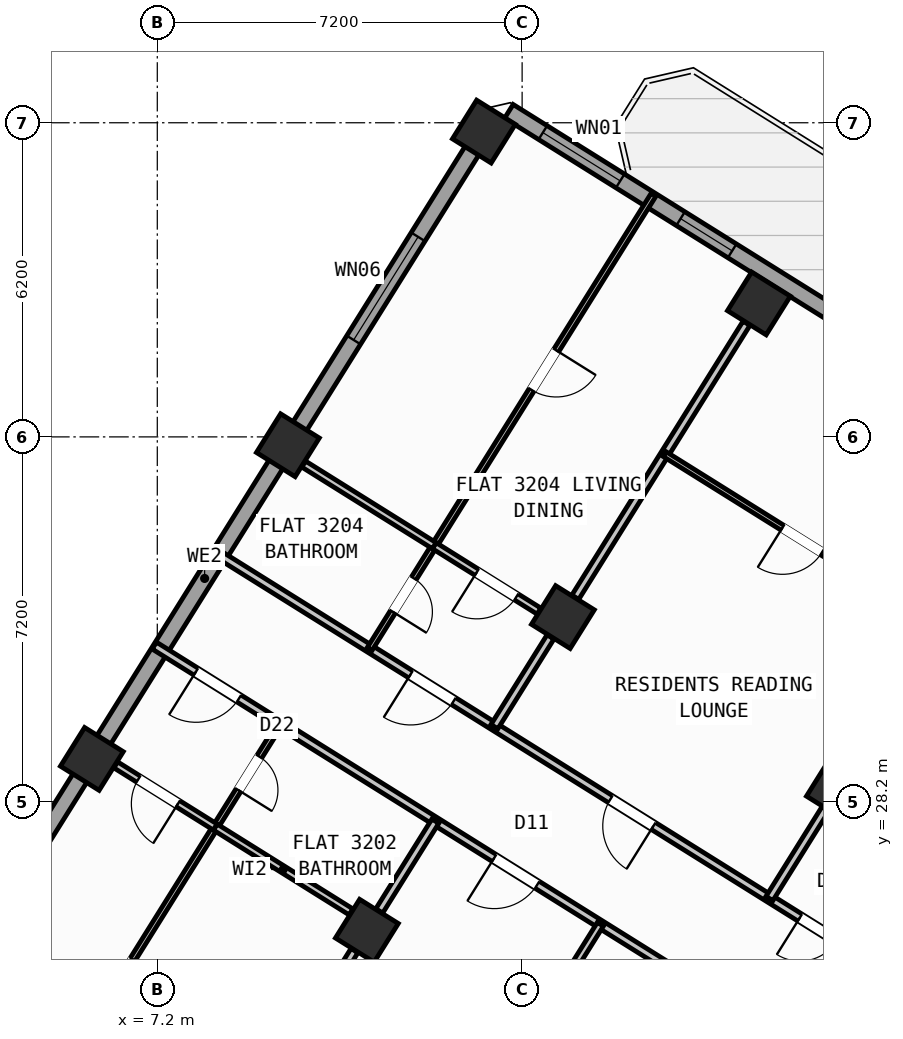
"""IFC4 building model, lengths in metres.
Left out: names, types, materials, properties, quantities, classifications, styles, units other than length and angle.
Written with IfcOpenShell. Run it as: python <this file> out.ifc"""

import sys

from ifc_helpers import new_model, si_unit, direction, frame, frame_2d, origin, origin_2d, place, context, subcontext, project, spatial, rectangle, hollow_rectangle, extrude, source, transform, mapped, element, fill, save


model = new_model("IFC4")
c1 = context("Model", 3, precision=1e-05, world=origin(), true_north=direction((0.0, 1.0)))
c2 = subcontext(c1, "Body", "Model", "MODEL_VIEW")
j1 = project(units=[si_unit("LENGTHUNIT", "METRE"), si_unit("PLANEANGLEUNIT", "RADIAN")], contexts=[c1])
p1 = place(None, origin())
s1 = spatial("IfcSite", under=j1, at=p1, CompositionType="ELEMENT")
p2 = place(p1, origin())
s2 = spatial("IfcBuilding", under=s1, at=p2, CompositionType="ELEMENT")
p3 = place(p2, frame((0.0, 0.0, 127.8)))
s3 = spatial("IfcBuildingStorey", under=s2, at=p3, CompositionType="ELEMENT", Elevation=127.8)
m1 = source(origin(), c2, "Body", "SweptSolid", [
    extrude(hollow_rectangle(XDim=0.9, YDim=0.9, WallThickness=0.036, at=origin_2d()), origin(), (0.0, 0.0, 1.0), 4.8),
])
for number, where, z_axis, x_axis in (
    (1, (20.632, 28.452, 0.0), (0.0, 0.0, 1.0), (-0.848, 0.53, 0.0)),
    (2, (19.073, 38.034, 0.0), (0.0, 0.0, 1.0), (-0.848, 0.53, 0.0)),
    (3, (15.205, 31.844, 0.0), (0.0, 0.0, 1.0), (-0.848, 0.53, 0.0)),
    (4, (11.336, 25.653, 0.0), (0.0, 0.0, 1.0), (-0.848, 0.53, 0.0)),
    (5, (13.646, 41.426, 0.0), (0.0, 0.0, 1.0), (-0.848, 0.53, 0.0)),
    (6, (9.777, 35.235, 0.0), (0.0, 0.0, 1.0), (-0.848, 0.53, 0.0)),
    (7, (5.909, 29.044, 0.0), (0.0, 0.0, 1.0), (-0.848, 0.53, 0.0)),
):
    element("IfcColumn", number, at=place(p3, frame(where, z_axis=z_axis, x_axis=x_axis)), inside=s3, PredefinedType="COLUMN", context=c2, shape_type="MappedRepresentation", body=[
        mapped(m1, transform((0.0, 0.0, 0.0), scale=1.0)),
    ])
p4 = place(p3, frame((2.415, 23.452, 0.0), z_axis=(0.0, 0.0, 1.0), x_axis=(0.52991049553, 0.848053575387, 0.0)))
e8 = element("IfcWall", 8, at=p4, inside=s3, PredefinedType="STANDARD", context=c2, shape_type="SweptSolid", body=[
    extrude(rectangle(XDim=21.587, YDim=0.32, at=frame_2d((10.794, 0.0))), origin(), (0.0, 0.0, 1.0), 3.975),
])
p5 = place(p4, frame((16.344, 0.0, 0.75)))
e9 = element("IfcOpeningElement", 9, at=p5, cuts=e8, PredefinedType="OPENING", context=c2, shape_type="SweptSolid", body=[
    extrude(rectangle(XDim=2.4, YDim=1.6, at=frame_2d((1.2, 0.8))), frame((0.0, 0.17, 0.0), z_axis=(0.0, -1.0, 0.0), x_axis=(1.0, 0.0, 0.0)), (0.0, 0.0, 1.0), 0.34),
])
p6 = place(p3, frame((14.138, 41.825, 0.0), z_axis=(0.0, 0.0, 1.0), x_axis=(0.848046498049, -0.529921821731, 0.0)))
e10 = element("IfcWall", 10, at=p6, inside=s3, PredefinedType="STANDARD", context=c2, shape_type="SweptSolid", body=[
    extrude(rectangle(XDim=31.588, YDim=0.32, at=frame_2d((15.794, 0.0))), origin(), (0.0, 0.0, 1.0), 4.55),
])
p7 = place(p6, frame((9.69, 0.0, 0.0)))
e11 = element("IfcOpeningElement", 11, at=p7, cuts=e10, PredefinedType="OPENING", context=c2, shape_type="SweptSolid", body=[
    extrude(rectangle(XDim=1.05, YDim=2.15, at=frame_2d((0.525, 1.075))), frame((0.0, 0.17, 0.0), z_axis=(0.0, -1.0, 0.0), x_axis=(1.0, 0.0, 0.0)), (0.0, 0.0, 1.0), 0.34),
])
p8 = place(p6, frame((14.666, 0.0, 0.0)))
e12 = element("IfcOpeningElement", 12, at=p8, cuts=e10, PredefinedType="OPENING", context=c2, shape_type="SweptSolid", body=[
    extrude(rectangle(XDim=1.5, YDim=2.25, at=frame_2d((0.75, 1.125))), frame((0.0, 0.17, 0.0), z_axis=(0.0, -1.0, 0.0), x_axis=(1.0, 0.0, 0.0)), (0.0, 0.0, 1.0), 0.34),
])
p9 = place(p6, frame((0.791, 0.0, 0.85)))
e13 = element("IfcOpeningElement", 13, at=p9, cuts=e10, PredefinedType="OPENING", context=c2, shape_type="SweptSolid", body=[
    extrude(rectangle(XDim=1.8, YDim=1.5, at=frame_2d((0.9, 0.75))), frame((0.0, 0.17, 0.0), z_axis=(0.0, -1.0, 0.0), x_axis=(1.0, 0.0, 0.0)), (0.0, 0.0, 1.0), 0.34),
])
p10 = place(p6, frame((3.996, 0.0, 0.95)))
e14 = element("IfcOpeningElement", 14, at=p10, cuts=e10, PredefinedType="OPENING", context=c2, shape_type="SweptSolid", body=[
    extrude(rectangle(XDim=1.2, YDim=1.4, at=frame_2d((0.6, 0.7))), frame((0.0, 0.17, 0.0), z_axis=(0.0, -1.0, 0.0), x_axis=(1.0, 0.0, 0.0)), (0.0, 0.0, 1.0), 0.34),
])
p11 = place(p6, frame((7.582, 0.0, 0.95)))
e15 = element("IfcOpeningElement", 15, at=p11, cuts=e10, PredefinedType="OPENING", context=c2, shape_type="SweptSolid", body=[
    extrude(rectangle(XDim=1.2, YDim=1.4, at=frame_2d((0.6, 0.7))), frame((0.0, 0.17, 0.0), z_axis=(0.0, -1.0, 0.0), x_axis=(1.0, 0.0, 0.0)), (0.0, 0.0, 1.0), 0.34),
])
p12 = place(p6, frame((21.381, 0.0, 0.75)))
e16 = element("IfcOpeningElement", 16, at=p12, cuts=e10, PredefinedType="OPENING", context=c2, shape_type="SweptSolid", body=[
    extrude(rectangle(XDim=2.4, YDim=1.6, at=frame_2d((1.2, 0.8))), frame((0.0, 0.17, 0.0), z_axis=(0.0, -1.0, 0.0), x_axis=(1.0, 0.0, 0.0)), (0.0, 0.0, 1.0), 0.34),
])
p13 = place(p6, frame((26.956, 0.0, 0.75)))
e17 = element("IfcOpeningElement", 17, at=p13, cuts=e10, PredefinedType="OPENING", context=c2, shape_type="SweptSolid", body=[
    extrude(rectangle(XDim=2.4, YDim=1.6, at=frame_2d((1.2, 0.8))), frame((0.0, 0.17, 0.0), z_axis=(0.0, -1.0, 0.0), x_axis=(1.0, 0.0, 0.0)), (0.0, 0.0, 1.0), 0.34),
])
p14 = place(p3, frame((22.495, 24.281, 0.0), z_axis=(0.0, 0.0, 1.0), x_axis=(-0.848052408131, 0.529912363569, 0.0)))
e18 = element("IfcWall", 18, at=p14, inside=s3, PredefinedType="PARTITIONING", context=c2, shape_type="SweptSolid", body=[
    extrude(rectangle(XDim=16.73, YDim=0.16, at=frame_2d((8.365, 0.0))), origin(), (0.0, 0.0, 1.0), 4.54),
])
p15 = place(p14, frame((2.22, 0.0, 0.0)))
e19 = element("IfcOpeningElement", 19, at=p15, cuts=e18, PredefinedType="OPENING", context=c2, shape_type="SweptSolid", body=[
    extrude(rectangle(XDim=0.86, YDim=2.05, at=frame_2d((0.43, 1.025))), frame((0.0, 0.09, 0.0), z_axis=(0.0, -1.0, 0.0), x_axis=(1.0, 0.0, 0.0)), (0.0, 0.0, 1.0), 0.18),
])
p16 = place(p14, frame((6.49, 0.0, 0.0)))
e20 = element("IfcOpeningElement", 20, at=p16, cuts=e18, PredefinedType="OPENING", context=c2, shape_type="SweptSolid", body=[
    extrude(rectangle(XDim=1.0, YDim=2.1, at=frame_2d((0.5, 1.05))), frame((0.0, 0.09, 0.0), z_axis=(0.0, -1.0, 0.0), x_axis=(1.0, 0.0, 0.0)), (0.0, 0.0, 1.0), 0.18),
])
p17 = place(p14, frame((11.14, 0.0, 0.0)))
e21 = element("IfcOpeningElement", 21, at=p17, cuts=e18, PredefinedType="OPENING", context=c2, shape_type="SweptSolid", body=[
    extrude(rectangle(XDim=1.0, YDim=2.1, at=frame_2d((0.5, 1.05))), frame((0.0, 0.09, 0.0), z_axis=(0.0, -1.0, 0.0), x_axis=(1.0, 0.0, 0.0)), (0.0, 0.0, 1.0), 0.18),
])
p18 = place(p3, frame((21.329, 22.416, 0.0), z_axis=(0.0, 0.0, 1.0), x_axis=(-0.848052408131, 0.529912363569, 0.0)))
e22 = element("IfcWall", 22, at=p18, inside=s3, PredefinedType="PARTITIONING", context=c2, shape_type="SweptSolid", body=[
    extrude(rectangle(XDim=16.73, YDim=0.16, at=frame_2d((8.365, 0.0))), origin(), (0.0, 0.0, 1.0), 4.54),
])
p19 = place(p18, frame((1.395, 0.0, 0.0)))
e23 = element("IfcOpeningElement", 23, at=p19, cuts=e22, PredefinedType="OPENING", context=c2, shape_type="SweptSolid", body=[
    extrude(rectangle(XDim=1.0, YDim=2.1, at=frame_2d((0.5, 1.05))), frame((0.0, 0.09, 0.0), z_axis=(0.0, -1.0, 0.0), x_axis=(1.0, 0.0, 0.0)), (0.0, 0.0, 1.0), 0.18),
])
p20 = place(p18, frame((7.82, 0.0, 0.0)))
e24 = element("IfcOpeningElement", 24, at=p20, cuts=e22, PredefinedType="OPENING", context=c2, shape_type="SweptSolid", body=[
    extrude(rectangle(XDim=1.0, YDim=2.1, at=frame_2d((0.5, 1.05))), frame((0.0, 0.09, 0.0), z_axis=(0.0, -1.0, 0.0), x_axis=(1.0, 0.0, 0.0)), (0.0, 0.0, 1.0), 0.18),
])
p21 = place(p18, frame((14.76, 0.0, 0.0)))
e25 = element("IfcOpeningElement", 25, at=p21, cuts=e22, PredefinedType="OPENING", context=c2, shape_type="SweptSolid", body=[
    extrude(rectangle(XDim=1.0, YDim=2.1, at=frame_2d((0.5, 1.05))), frame((0.0, 0.09, 0.0), z_axis=(0.0, -1.0, 0.0), x_axis=(1.0, 0.0, 0.0)), (0.0, 0.0, 1.0), 0.18),
])
p22 = place(p3, frame((12.688, 27.815, 0.0), z_axis=(0.0, 0.0, 1.0), x_axis=(-0.529988430496, -0.848004872356, 0.0)))
e26 = element("IfcWall", 26, at=p22, inside=s3, PredefinedType="PARTITIONING", context=c2, shape_type="SweptSolid", body=[
    extrude(rectangle(XDim=2.088, YDim=0.16, at=frame_2d((1.044, 0.0))), origin(), (0.0, 0.0, 1.0), 3.975),
])
p23 = place(p3, frame((11.091, 25.261, 0.0), z_axis=(0.0, 0.0, 1.0), x_axis=(-0.52994257524, -0.848033529377, 0.0)))
e27 = element("IfcWall", 27, at=p23, inside=s3, PredefinedType="PARTITIONING", context=c2, shape_type="SweptSolid", body=[
    extrude(rectangle(XDim=5.451, YDim=0.16, at=frame_2d((2.726, 0.0))), origin(), (0.0, 0.0, 1.0), 3.975),
])
p24 = place(p3, frame((15.944, 25.781, 0.0), z_axis=(0.0, 0.0, 1.0), x_axis=(-0.529917480809, -0.848049210561, 0.0)))
e28 = element("IfcWall", 28, at=p24, inside=s3, PredefinedType="PLUMBINGWALL", context=c2, shape_type="SweptSolid", body=[
    extrude(rectangle(XDim=4.58, YDim=0.14, at=frame_2d((2.29, 0.0))), origin(), (0.0, 0.0, 1.0), 4.54),
])
p25 = place(p24, frame((1.9, 0.0, 0.0)))
e29 = element("IfcOpeningElement", 29, at=p25, cuts=e28, PredefinedType="OPENING", context=c2, shape_type="SweptSolid", body=[
    extrude(rectangle(XDim=0.78, YDim=2.05, at=frame_2d((0.39, 1.025))), frame((0.0, 0.08, 0.0), z_axis=(0.0, -1.0, 0.0), x_axis=(1.0, 0.0, 0.0)), (0.0, 0.0, 1.0), 0.16),
])
p26 = place(p3, frame((9.617, 29.734, 0.0), z_axis=(0.0, 0.0, 1.0), x_axis=(-0.529917830441, -0.848048992088, 0.0)))
e30 = element("IfcWall", 30, at=p26, inside=s3, PredefinedType="PARTITIONING", context=c2, shape_type="SweptSolid", body=[
    extrude(rectangle(XDim=9.47, YDim=0.11, at=frame_2d((4.735, 0.0))), origin(), (0.0, 0.0, 1.0), 4.54),
])
p27 = place(p26, frame((0.76, 0.0, 0.0)))
e31 = element("IfcOpeningElement", 31, at=p27, cuts=e30, PredefinedType="OPENING", context=c2, shape_type="SweptSolid", body=[
    extrude(rectangle(XDim=0.78, YDim=2.05, at=frame_2d((0.39, 1.025))), frame((0.0, 0.065, 0.0), z_axis=(0.0, -1.0, 0.0), x_axis=(1.0, 0.0, 0.0)), (0.0, 0.0, 1.0), 0.13),
])
p28 = place(p26, frame((5.475, 0.0, 0.0)))
e32 = element("IfcOpeningElement", 32, at=p28, cuts=e30, PredefinedType="OPENING", context=c2, shape_type="SweptSolid", body=[
    extrude(rectangle(XDim=0.92, YDim=2.08, at=frame_2d((0.46, 1.04))), frame((0.0, 0.065, 0.0), z_axis=(0.0, -1.0, 0.0), x_axis=(1.0, 0.0, 0.0)), (0.0, 0.0, 1.0), 0.13),
])
p29 = place(p3, frame((8.346, 27.698, 0.0), z_axis=(0.0, 0.0, 1.0), x_axis=(-0.848021970166, 0.529961072265, 0.0)))
e33 = element("IfcWall", 33, at=p29, inside=s3, PredefinedType="PLUMBINGWALL", context=c2, shape_type="SweptSolid", body=[
    extrude(rectangle(XDim=2.318, YDim=0.14, at=frame_2d((1.159, 0.0))), origin(), (0.0, 0.0, 1.0), 3.975),
])
p30 = place(p29, frame((0.87, 0.0, 0.0)))
e34 = element("IfcOpeningElement", 34, at=p30, cuts=e33, PredefinedType="OPENING", context=c2, shape_type="SweptSolid", body=[
    extrude(rectangle(XDim=0.92, YDim=2.08, at=frame_2d((0.46, 1.04))), frame((0.0, 0.08, 0.0), z_axis=(0.0, -1.0, 0.0), x_axis=(1.0, 0.0, 0.0)), (0.0, 0.0, 1.0), 0.16),
])
p31 = place(p3, frame((11.024, 26.025, 0.0), z_axis=(0.0, 0.0, 1.0), x_axis=(-0.848054764307, 0.529908592812, 0.0)))
e35 = element("IfcWall", 35, at=p31, inside=s3, PredefinedType="PLUMBINGWALL", context=c2, shape_type="SweptSolid", body=[
    extrude(rectangle(XDim=3.158, YDim=0.14, at=frame_2d((1.579, 0.0))), origin(), (0.0, 0.0, 1.0), 3.975),
])
p32 = place(p3, frame((20.387, 28.06, 0.0), z_axis=(0.0, 0.0, 1.0), x_axis=(-0.529904345651, -0.848057418139, 0.0)))
e36 = element("IfcWall", 36, at=p32, inside=s3, PredefinedType="PARTITIONING", context=c2, shape_type="SweptSolid", body=[
    extrude(rectangle(XDim=2.088, YDim=0.16, at=frame_2d((1.044, 0.0))), origin(), (0.0, 0.0, 1.0), 3.975),
])
p33 = place(p3, frame((18.828, 37.643, 0.0), z_axis=(0.0, 0.0, 1.0), x_axis=(-0.529930102756, -0.848041323399, 0.0)))
e37 = element("IfcWall", 37, at=p33, inside=s3, PredefinedType="PARTITIONING", context=c2, shape_type="SweptSolid", body=[
    extrude(rectangle(XDim=6.376, YDim=0.16, at=frame_2d((3.188, 0.0))), origin(), (0.0, 0.0, 1.0), 3.975),
])
p34 = place(p3, frame((14.96, 31.452, 0.0), z_axis=(0.0, 0.0, 1.0), x_axis=(-0.529956894714, -0.848024580862, 0.0)))
e38 = element("IfcWall", 38, at=p34, inside=s3, PredefinedType="PARTITIONING", context=c2, shape_type="SweptSolid", body=[
    extrude(rectangle(XDim=2.088, YDim=0.16, at=frame_2d((1.044, 0.0))), origin(), (0.0, 0.0, 1.0), 3.975),
])
p35 = place(p3, frame((22.642, 31.668, 0.0), z_axis=(0.0, 0.0, 1.0), x_axis=(-0.84806687439, 0.529889211593, 0.0)))
e39 = element("IfcWall", 39, at=p35, inside=s3, PredefinedType="PARTITIONING", context=c2, shape_type="SweptSolid", body=[
    extrude(rectangle(XDim=6.4, YDim=0.11, at=frame_2d((3.2, 0.0))), origin(), (0.0, 0.0, 1.0), 4.54),
])
p36 = place(p35, frame((2.74, 0.0, 0.0)))
e40 = element("IfcOpeningElement", 40, at=p36, cuts=e39, PredefinedType="OPENING", context=c2, shape_type="SweptSolid", body=[
    extrude(rectangle(XDim=0.92, YDim=2.08, at=frame_2d((0.46, 1.04))), frame((0.0, 0.065, 0.0), z_axis=(0.0, -1.0, 0.0), x_axis=(1.0, 0.0, 0.0)), (0.0, 0.0, 1.0), 0.13),
])
p37 = place(p3, frame((16.995, 40.182, 0.0), z_axis=(0.0, 0.0, 1.0), x_axis=(-0.529924195719, -0.848045014602, 0.0)))
e41 = element("IfcWall", 41, at=p37, inside=s3, PredefinedType="PARTITIONING", context=c2, shape_type="SweptSolid", body=[
    extrude(rectangle(XDim=10.57, YDim=0.11, at=frame_2d((5.285, 0.0))), origin(), (0.0, 0.0, 1.0), 4.54),
])
p38 = place(p37, frame((8.93, 0.0, 0.0)))
e42 = element("IfcOpeningElement", 42, at=p38, cuts=e41, PredefinedType="OPENING", context=c2, shape_type="SweptSolid", body=[
    extrude(rectangle(XDim=0.78, YDim=2.05, at=frame_2d((0.39, 1.025))), frame((0.0, 0.065, 0.0), z_axis=(0.0, -1.0, 0.0), x_axis=(1.0, 0.0, 0.0)), (0.0, 0.0, 1.0), 0.13),
])
p39 = place(p37, frame((3.625, 0.0, 0.0)))
e43 = element("IfcOpeningElement", 43, at=p39, cuts=e41, PredefinedType="OPENING", context=c2, shape_type="SweptSolid", body=[
    extrude(rectangle(XDim=0.92, YDim=2.08, at=frame_2d((0.46, 1.04))), frame((0.0, 0.065, 0.0), z_axis=(0.0, -1.0, 0.0), x_axis=(1.0, 0.0, 0.0)), (0.0, 0.0, 1.0), 0.13),
])
p40 = place(p3, frame((14.733, 31.961, 0.0), z_axis=(0.0, 0.0, 1.0), x_axis=(-0.848020807548, 0.529962932634, 0.0)))
e44 = element("IfcWall", 44, at=p40, inside=s3, PredefinedType="PLUMBINGWALL", context=c2, shape_type="SweptSolid", body=[
    extrude(rectangle(XDim=2.438, YDim=0.14, at=frame_2d((1.219, 0.0))), origin(), (0.0, 0.0, 1.0), 3.975),
])
p41 = place(p40, frame((0.528, 0.0, 0.0)))
e45 = element("IfcOpeningElement", 45, at=p41, cuts=e44, PredefinedType="OPENING", context=c2, shape_type="SweptSolid", body=[
    extrude(rectangle(XDim=0.92, YDim=2.08, at=frame_2d((0.46, 1.04))), frame((0.0, 0.08, 0.0), z_axis=(0.0, -1.0, 0.0), x_axis=(1.0, 0.0, 0.0)), (0.0, 0.0, 1.0), 0.16),
])
p42 = place(p3, frame((12.666, 33.253, 0.0), z_axis=(0.0, 0.0, 1.0), x_axis=(-0.848056989933, 0.52990503095, 0.0)))
e46 = element("IfcWall", 46, at=p42, inside=s3, PredefinedType="PLUMBINGWALL", context=c2, shape_type="SweptSolid", body=[
    extrude(rectangle(XDim=3.038, YDim=0.14, at=frame_2d((1.519, 0.0))), origin(), (0.0, 0.0, 1.0), 3.975),
])
m2 = source(origin(), c2, "Body", "SweptSolid", [
    extrude(rectangle(XDim=2.4, YDim=1.6, at=frame_2d((1.2, 0.8))), frame((0.0, 0.03, 0.0), z_axis=(0.0, -1.0, 0.0), x_axis=(1.0, 0.0, 0.0)), (0.0, 0.0, 1.0), 0.06),
])
p43 = place(p5, origin())
e47 = element("IfcWindow", 47, at=p43, inside=s3, PartitioningType="SINGLE_PANEL", PredefinedType="WINDOW", context=c2, shape_type="MappedRepresentation", body=[
    mapped(m2, transform((0.0, 0.0, 0.0), scale=1.0)),
])
fill(e9, e47)
m3 = source(origin(), c2, "Body", "SweptSolid", [
    extrude(rectangle(XDim=1.8, YDim=1.5, at=frame_2d((0.9, 0.75))), frame((0.0, 0.03, 0.0), z_axis=(0.0, -1.0, 0.0), x_axis=(1.0, 0.0, 0.0)), (0.0, 0.0, 1.0), 0.06),
])
p44 = place(p9, origin())
e48 = element("IfcWindow", 48, at=p44, inside=s3, PartitioningType="SINGLE_PANEL", PredefinedType="WINDOW", context=c2, shape_type="MappedRepresentation", body=[
    mapped(m3, transform((0.0, 0.0, 0.0), scale=1.0)),
])
fill(e13, e48)
m4 = source(origin(), c2, "Body", "SweptSolid", [
    extrude(rectangle(XDim=1.2, YDim=1.4, at=frame_2d((0.6, 0.7))), frame((0.0, 0.03, 0.0), z_axis=(0.0, -1.0, 0.0), x_axis=(1.0, 0.0, 0.0)), (0.0, 0.0, 1.0), 0.06),
])
p45 = place(p10, origin())
e49 = element("IfcWindow", 49, at=p45, inside=s3, PartitioningType="SINGLE_PANEL", PredefinedType="WINDOW", context=c2, shape_type="MappedRepresentation", body=[
    mapped(m4, transform((0.0, 0.0, 0.0), scale=1.0)),
])
fill(e14, e49)
m5 = source(origin(), c2, "Body", "SweptSolid", [
    extrude(rectangle(XDim=1.0, YDim=2.1, at=frame_2d((0.5, 1.05))), frame((0.0, 0.025, 0.0), z_axis=(0.0, -1.0, 0.0), x_axis=(1.0, 0.0, 0.0)), (0.0, 0.0, 1.0), 0.05),
])
p46 = place(p20, origin())
e50 = element("IfcDoor", 50, at=p46, inside=s3, OperationType="SINGLE_SWING_RIGHT", PredefinedType="DOOR", context=c2, shape_type="MappedRepresentation", body=[
    mapped(m5, transform((0.0, 0.0, 0.0), scale=1.0)),
])
fill(e24, e50)
p47 = place(p21, origin())
e51 = element("IfcDoor", 51, at=p47, inside=s3, OperationType="SINGLE_SWING_RIGHT", PredefinedType="DOOR", context=c2, shape_type="MappedRepresentation", body=[
    mapped(m5, transform((0.0, 0.0, 0.0), scale=1.0)),
])
fill(e25, e51)
m6 = source(origin(), c2, "Body", "SweptSolid", [
    extrude(rectangle(XDim=0.92, YDim=2.08, at=frame_2d((0.46, 1.04))), frame((0.0, 0.025, 0.0), z_axis=(0.0, -1.0, 0.0), x_axis=(1.0, 0.0, 0.0)), (0.0, 0.0, 1.0), 0.05),
])
p48 = place(p30, origin())
e52 = element("IfcDoor", 52, at=p48, inside=s3, OperationType="SINGLE_SWING_LEFT", PredefinedType="DOOR", context=c2, shape_type="MappedRepresentation", body=[
    mapped(m6, transform((0.0, 0.0, 0.0), scale=1.0)),
])
fill(e34, e52)
m7 = source(origin(), c2, "Body", "SweptSolid", [
    extrude(rectangle(XDim=0.78, YDim=2.05, at=frame_2d((0.39, 1.025))), frame((0.0, 0.025, 0.0), z_axis=(0.0, -1.0, 0.0), x_axis=(1.0, 0.0, 0.0)), (0.0, 0.0, 1.0), 0.05),
])
p49 = place(p27, origin())
e53 = element("IfcDoor", 53, at=p49, inside=s3, OperationType="SINGLE_SWING_RIGHT", PredefinedType="DOOR", context=c2, shape_type="MappedRepresentation", body=[
    mapped(m7, transform((0.0, 0.0, 0.0), scale=1.0)),
])
fill(e31, e53)
p50 = place(p28, origin())
e54 = element("IfcDoor", 54, at=p50, inside=s3, OperationType="SINGLE_SWING_LEFT", PredefinedType="DOOR", context=c2, shape_type="MappedRepresentation", body=[
    mapped(m6, transform((0.0, 0.0, 0.0), scale=1.0)),
])
fill(e32, e54)
m8 = source(origin(), c2, "Body", "SweptSolid", [
    extrude(rectangle(XDim=0.86, YDim=2.05, at=frame_2d((0.43, 1.025))), frame((0.0, 0.025, 0.0), z_axis=(0.0, -1.0, 0.0), x_axis=(1.0, 0.0, 0.0)), (0.0, 0.0, 1.0), 0.05),
])
p51 = place(p15, origin())
e55 = element("IfcDoor", 55, at=p51, inside=s3, OperationType="SINGLE_SWING_RIGHT", PredefinedType="DOOR", context=c2, shape_type="MappedRepresentation", body=[
    mapped(m8, transform((0.0, 0.0, 0.0), scale=1.0)),
])
fill(e19, e55)
p52 = place(p16, origin())
e56 = element("IfcDoor", 56, at=p52, inside=s3, OperationType="SINGLE_SWING_LEFT", PredefinedType="DOOR", context=c2, shape_type="MappedRepresentation", body=[
    mapped(m5, transform((0.0, 0.0, 0.0), scale=1.0)),
])
fill(e20, e56)
p53 = place(p36, origin())
e57 = element("IfcDoor", 57, at=p53, inside=s3, OperationType="SINGLE_SWING_RIGHT", PredefinedType="DOOR", context=c2, shape_type="MappedRepresentation", body=[
    mapped(m6, transform((0.0, 0.0, 0.0), scale=1.0)),
])
fill(e40, e57)
p54 = place(p17, origin())
e58 = element("IfcDoor", 58, at=p54, inside=s3, OperationType="SINGLE_SWING_RIGHT", PredefinedType="DOOR", context=c2, shape_type="MappedRepresentation", body=[
    mapped(m5, transform((0.0, 0.0, 0.0), scale=1.0)),
])
fill(e21, e58)
p55 = place(p41, origin())
e59 = element("IfcDoor", 59, at=p55, inside=s3, OperationType="SINGLE_SWING_RIGHT", PredefinedType="DOOR", context=c2, shape_type="MappedRepresentation", body=[
    mapped(m6, transform((0.0, 0.0, 0.0), scale=1.0)),
])
fill(e45, e59)
p56 = place(p38, origin())
e60 = element("IfcDoor", 60, at=p56, inside=s3, OperationType="SINGLE_SWING_RIGHT", PredefinedType="DOOR", context=c2, shape_type="MappedRepresentation", body=[
    mapped(m7, transform((0.0, 0.0, 0.0), scale=1.0)),
])
fill(e42, e60)
p57 = place(p39, origin())
e61 = element("IfcDoor", 61, at=p57, inside=s3, OperationType="SINGLE_SWING_LEFT", PredefinedType="DOOR", context=c2, shape_type="MappedRepresentation", body=[
    mapped(m6, transform((0.0, 0.0, 0.0), scale=1.0)),
])
fill(e43, e61)
save(model, sys.argv[1])
